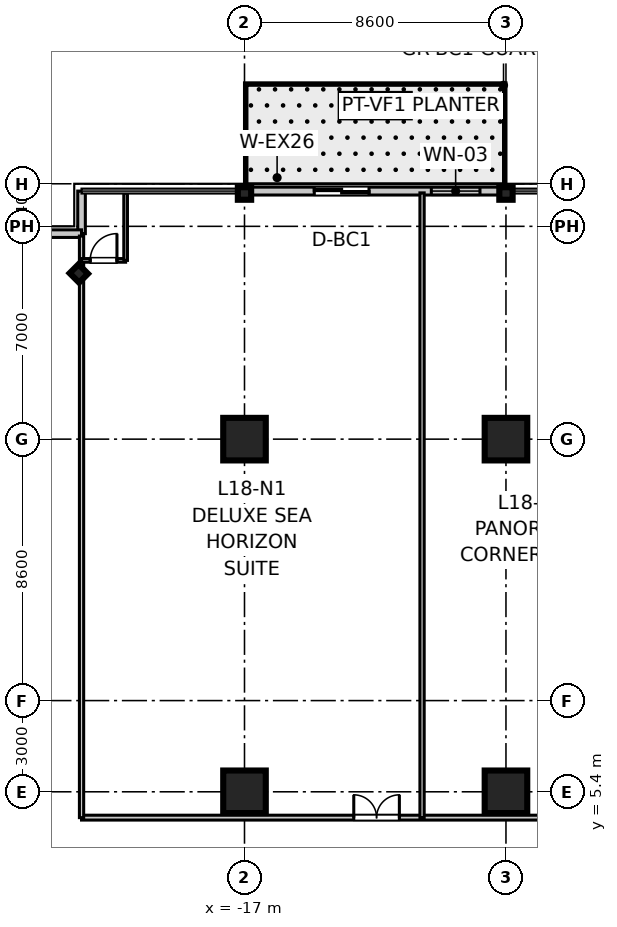
"""IFC4 building model, lengths in metres.
Left out: names, types, materials, properties, quantities, classifications, styles, units other than length and angle.
Written with IfcOpenShell. Run it as: python <this file> out.ifc"""

import sys

from ifc_helpers import new_model, si_unit, direction, frame, frame_2d, origin, origin_2d, place, context, subcontext, project, spatial, rectangle, i_section, extrude, source, transform, mapped, element, fill, save


model = new_model("IFC4")
c1 = context("Model", 3, precision=1e-05, world=origin(), true_north=direction((0.0, 1.0)))
c2 = subcontext(c1, "Body", "Model", "MODEL_VIEW")
j1 = project(units=[si_unit("LENGTHUNIT", "METRE"), si_unit("PLANEANGLEUNIT", "RADIAN")], contexts=[c1])
p1 = place(None, origin())
s1 = spatial("IfcSite", under=j1, at=p1, CompositionType="ELEMENT")
p2 = place(p1, origin())
s2 = spatial("IfcBuilding", under=s1, at=p2, CompositionType="ELEMENT")
p3 = place(p2, frame((0.0, 0.0, 76.2)))
s3 = spatial("IfcBuildingStorey", under=s2, at=p3, CompositionType="ELEMENT", Elevation=76.2)
m1 = source(origin(), c2, "Body", "SweptSolid", [
    extrude(rectangle(XDim=1.4, YDim=1.4, at=origin_2d()), origin(), (0.0, 0.0, 1.0), 3.605),
])
for number, where, z_axis, x_axis in (
    (1, (-17.0, 5.4, 0.0), (0.0, 0.0, 1.0), (1.0, 0.0, 0.0)),
    (2, (-17.0, 17.0, 0.0), (0.0, 0.0, 1.0), (1.0, 0.0, 0.0)),
    (3, (-8.4, 5.4, 0.0), (0.0, 0.0, 1.0), (1.0, 0.0, 0.0)),
    (4, (-8.4, 17.0, 0.0), (0.0, 0.0, 1.0), (1.0, 0.0, 0.0)),
):
    element("IfcColumn", number, at=place(p3, frame(where, z_axis=z_axis, x_axis=x_axis)), inside=s3, PredefinedType="COLUMN", context=c2, shape_type="MappedRepresentation", body=[
        mapped(m1, transform((0.0, 0.0, 0.0), scale=1.0)),
    ])
m2 = source(origin(), c2, "Body", "SweptSolid", [
    extrude(i_section(OverallWidth=0.412, OverallDepth=0.438, WebThickness=0.023, FlangeThickness=0.036, at=origin_2d()), origin(), (0.0, 0.0, 1.0), 3.505),
])
for number, where, z_axis, x_axis in (
    (5, (-17.0, 25.08, 0.0), (0.0, 0.0, 1.0), (0.0, 1.0, 0.0)),
    (6, (-8.4, 25.08, 0.0), (0.0, 0.0, 1.0), (0.0, 1.0, 0.0)),
    (7, (-22.45, 22.45, 0.0), (0.0, 0.0, 1.0), (0.707, 0.707, 0.0)),
):
    element("IfcColumn", number, at=place(p3, frame(where, z_axis=z_axis, x_axis=x_axis)), inside=s3, PredefinedType="COLUMN", context=c2, shape_type="MappedRepresentation", body=[
        mapped(m2, transform((0.0, 0.0, 0.0), scale=1.0)),
    ])
m3 = source(origin(), c2, "Body", "SweptSolid", [
    extrude(rectangle(XDim=1.4, YDim=0.25, at=frame_2d((0.7, 0.0))), origin(), (0.0, 0.0, 1.0), 3.37),
])
for number, where, z_axis, x_axis in (
    (8, (-22.36, 23.76, 0.0), (0.0, 0.0, 1.0), (0.0, 1.0, 0.0)),
    (9, (-23.76, 23.76, 0.0), (0.0, 0.0, 1.0), (1.0, 0.0, 0.0)),
):
    element("IfcWall", number, at=place(p3, frame(where, z_axis=z_axis, x_axis=x_axis)), inside=s3, PredefinedType="STANDARD", context=c2, shape_type="MappedRepresentation", body=[
        mapped(m3, transform((0.0, 0.0, 0.0), scale=1.0)),
    ])
m4 = source(origin(), c2, "Body", "SweptSolid", [
    extrude(rectangle(XDim=8.6, YDim=0.26, at=frame_2d((4.3, 0.0))), origin(), (0.0, 0.0, 1.0), 2.85),
])
p4 = place(p3, frame((-17.0, 25.16, 0.0), z_axis=(0.0, 0.0, 1.0), x_axis=(1.0, 0.0, 0.0)))
e10 = element("IfcWall", 10, at=p4, inside=s3, PredefinedType="STANDARD", context=c2, shape_type="MappedRepresentation", body=[
    mapped(m4, transform((0.0, 0.0, 0.0), scale=1.0)),
])
p5 = place(p4, frame((2.295, 0.0, 0.0)))
e11 = element("IfcOpeningElement", 11, at=p5, cuts=e10, PredefinedType="OPENING", context=c2, shape_type="SweptSolid", body=[
    extrude(rectangle(XDim=1.8, YDim=2.25, at=frame_2d((0.9, 1.125))), frame((0.0, 0.14, 0.0), z_axis=(0.0, -1.0, 0.0), x_axis=(1.0, 0.0, 0.0)), (0.0, 0.0, 1.0), 0.28),
])
p6 = place(p4, frame((6.145, 0.0, 0.85)))
e12 = element("IfcOpeningElement", 12, at=p6, cuts=e10, PredefinedType="OPENING", context=c2, shape_type="SweptSolid", body=[
    extrude(rectangle(XDim=1.6, YDim=1.8, at=frame_2d((0.8, 0.9))), frame((0.0, 0.14, 0.0), z_axis=(0.0, -1.0, 0.0), x_axis=(1.0, 0.0, 0.0)), (0.0, 0.0, 1.0), 0.28),
])
m5 = source(origin(), c2, "Body", "SweptSolid", [
    extrude(rectangle(XDim=25.7, YDim=0.16, at=frame_2d((12.85, 0.0))), origin(), (0.0, 0.0, 1.0), 2.71),
])
p7 = place(p3, frame((-22.36, 4.55, 0.0), z_axis=(0.0, 0.0, 1.0), x_axis=(1.0, 0.0, 0.0)))
e13 = element("IfcWall", 13, at=p7, inside=s3, PredefinedType="PARTITIONING", context=c2, shape_type="MappedRepresentation", body=[
    mapped(m5, transform((0.0, 0.0, 0.0), scale=1.0)),
])
p8 = place(p7, frame((8.954, 0.0, 0.0)))
e14 = element("IfcOpeningElement", 14, at=p8, cuts=e13, PredefinedType="OPENING", context=c2, shape_type="SweptSolid", body=[
    extrude(rectangle(XDim=1.5, YDim=2.15, at=frame_2d((0.75, 1.075))), frame((0.0, 0.09, 0.0), z_axis=(0.0, -1.0, 0.0), x_axis=(1.0, 0.0, 0.0)), (0.0, 0.0, 1.0), 0.18),
])
p9 = place(p7, frame((15.985, 0.0, 0.0)))
e15 = element("IfcOpeningElement", 15, at=p9, cuts=e13, PredefinedType="OPENING", context=c2, shape_type="SweptSolid", body=[
    extrude(rectangle(XDim=1.5, YDim=2.15, at=frame_2d((0.75, 1.075))), frame((0.0, 0.09, 0.0), z_axis=(0.0, -1.0, 0.0), x_axis=(1.0, 0.0, 0.0)), (0.0, 0.0, 1.0), 0.18),
])
p10 = place(p7, frame((21.564, 0.0, 0.0)))
e16 = element("IfcOpeningElement", 16, at=p10, cuts=e13, PredefinedType="OPENING", context=c2, shape_type="SweptSolid", body=[
    extrude(rectangle(XDim=1.5, YDim=2.15, at=frame_2d((0.75, 1.075))), frame((0.0, 0.09, 0.0), z_axis=(0.0, -1.0, 0.0), x_axis=(1.0, 0.0, 0.0)), (0.0, 0.0, 1.0), 0.18),
])
m6 = source(origin(), c2, "Body", "SweptSolid", [
    extrude(rectangle(XDim=19.13, YDim=0.14, at=frame_2d((9.565, 0.0))), origin(), (0.0, 0.0, 1.0), 2.71),
])
p11 = place(p3, frame((-22.36, 4.55, 0.0), z_axis=(0.0, 0.0, 1.0), x_axis=(0.0, 1.0, 0.0)))
e17 = element("IfcWall", 17, at=p11, inside=s3, PredefinedType="PARTITIONING", context=c2, shape_type="MappedRepresentation", body=[
    mapped(m6, transform((0.0, 0.0, 0.0), scale=1.0)),
])
m7 = source(origin(), c2, "Body", "SweptSolid", [
    extrude(rectangle(XDim=1.45, YDim=0.12, at=frame_2d((0.725, 0.0))), origin(), (0.0, 0.0, 1.0), 2.71),
])
p12 = place(p3, frame((-22.36, 22.88, 0.0), z_axis=(0.0, 0.0, 1.0), x_axis=(1.0, 0.0, 0.0)))
e18 = element("IfcWall", 18, at=p12, inside=s3, PredefinedType="PARTITIONING", context=c2, shape_type="MappedRepresentation", body=[
    mapped(m7, transform((0.0, 0.0, 0.0), scale=1.0)),
])
p13 = place(p12, frame((0.285, 0.0, 0.0)))
e19 = element("IfcOpeningElement", 19, at=p13, cuts=e18, PredefinedType="OPENING", context=c2, shape_type="SweptSolid", body=[
    extrude(rectangle(XDim=0.88, YDim=2.1, at=frame_2d((0.44, 1.05))), frame((0.0, 0.07, 0.0), z_axis=(0.0, -1.0, 0.0), x_axis=(1.0, 0.0, 0.0)), (0.0, 0.0, 1.0), 0.14),
])
m8 = source(origin(), c2, "Body", "SweptSolid", [
    extrude(rectangle(XDim=2.22, YDim=0.12, at=frame_2d((1.11, 0.0))), origin(), (0.0, 0.0, 1.0), 2.71),
])
p14 = place(p3, frame((-20.91, 22.88, 0.0), z_axis=(0.0, 0.0, 1.0), x_axis=(0.0, 1.0, 0.0)))
e20 = element("IfcWall", 20, at=p14, inside=s3, PredefinedType="PARTITIONING", context=c2, shape_type="MappedRepresentation", body=[
    mapped(m8, transform((0.0, 0.0, 0.0), scale=1.0)),
])
m9 = source(origin(), c2, "Body", "SweptSolid", [
    extrude(rectangle(XDim=20.55, YDim=0.14, at=frame_2d((10.275, 0.0))), origin(), (0.0, 0.0, 1.0), 2.71),
])
p15 = place(p3, frame((-11.16, 4.55, 0.0), z_axis=(0.0, 0.0, 1.0), x_axis=(0.0, 1.0, 0.0)))
e21 = element("IfcWall", 21, at=p15, inside=s3, PredefinedType="PARTITIONING", context=c2, shape_type="MappedRepresentation", body=[
    mapped(m9, transform((0.0, 0.0, 0.0), scale=1.0)),
])
m10 = source(origin(), c2, "Body", "SweptSolid", [
    extrude(rectangle(XDim=0.88, YDim=2.1, at=frame_2d((0.44, 1.05))), frame((0.0, 0.025, 0.0), z_axis=(0.0, -1.0, 0.0), x_axis=(1.0, 0.0, 0.0)), (0.0, 0.0, 1.0), 0.05),
])
p16 = place(p13, origin())
e22 = element("IfcDoor", 22, at=p16, inside=s3, OperationType="SINGLE_SWING_RIGHT", PredefinedType="DOOR", context=c2, shape_type="MappedRepresentation", body=[
    mapped(m10, transform((0.0, 0.0, 0.0), scale=1.0)),
])
fill(e19, e22)
m11 = source(origin(), c2, "Body", "SweptSolid", [
    extrude(rectangle(XDim=1.5, YDim=2.15, at=frame_2d((0.75, 1.075))), frame((0.0, 0.025, 0.0), z_axis=(0.0, -1.0, 0.0), x_axis=(1.0, 0.0, 0.0)), (0.0, 0.0, 1.0), 0.05),
])
p17 = place(p8, origin())
e23 = element("IfcDoor", 23, at=p17, inside=s3, OperationType="DOUBLE_DOOR_SINGLE_SWING", PredefinedType="DOOR", context=c2, shape_type="MappedRepresentation", body=[
    mapped(m11, transform((0.0, 0.0, 0.0), scale=1.0)),
])
fill(e14, e23)
m12 = source(origin(), c2, "Body", "SweptSolid", [
    extrude(rectangle(XDim=1.8, YDim=2.25, at=frame_2d((0.9, 1.125))), frame((0.0, 0.025, 0.0), z_axis=(0.0, -1.0, 0.0), x_axis=(1.0, 0.0, 0.0)), (0.0, 0.0, 1.0), 0.05),
])
p18 = place(p5, origin())
e24 = element("IfcDoor", 24, at=p18, inside=s3, OperationType="DOUBLE_DOOR_SLIDING", PredefinedType="DOOR", context=c2, shape_type="MappedRepresentation", body=[
    mapped(m12, transform((0.0, 0.0, 0.0), scale=1.0)),
])
fill(e11, e24)
m13 = source(origin(), c2, "Body", "SweptSolid", [
    extrude(rectangle(XDim=1.6, YDim=1.8, at=frame_2d((0.8, 0.9))), frame((0.0, 0.03, 0.0), z_axis=(0.0, -1.0, 0.0), x_axis=(1.0, 0.0, 0.0)), (0.0, 0.0, 1.0), 0.06),
])
p19 = place(p6, origin())
e25 = element("IfcWindow", 25, at=p19, inside=s3, PartitioningType="SINGLE_PANEL", PredefinedType="WINDOW", context=c2, shape_type="MappedRepresentation", body=[
    mapped(m13, transform((0.0, 0.0, 0.0), scale=1.0)),
])
fill(e12, e25)
save(model, sys.argv[1])
